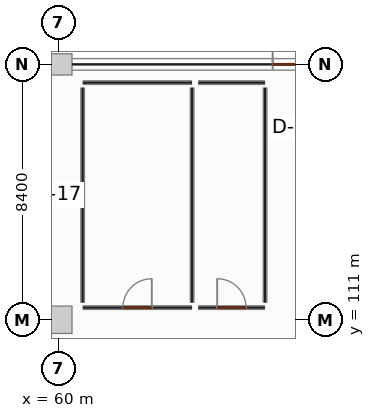
"""IFC4 building model, lengths in metres.
Left out: names, types, materials, properties, quantities, classifications, styles, units other than length and angle.
Written with IfcOpenShell. Run it as: python <this file> out.ifc"""

import sys

from ifc_helpers import new_model, si_unit, direction, frame, frame_2d, origin, origin_2d, place, context, subcontext, project, spatial, rectangle, extrude, element, fill, save


model = new_model("IFC4")
c1 = context("Model", 3, precision=1e-05, world=origin(), true_north=direction((0.0, 1.0)))
c2 = subcontext(c1, "Body", "Model", "MODEL_VIEW")
j1 = project(units=[si_unit("LENGTHUNIT", "METRE"), si_unit("PLANEANGLEUNIT", "RADIAN")], contexts=[c1])
p1 = place(None, origin())
s1 = spatial("IfcSite", under=j1, at=p1, CompositionType="ELEMENT")
p2 = place(p1, origin())
s2 = spatial("IfcBuilding", under=s1, at=p2, CompositionType="ELEMENT")
p3 = place(p2, origin())
s3 = spatial("IfcBuildingStorey", under=s2, at=p3, CompositionType="ELEMENT", Elevation=0.0)
p4 = place(p3, frame((60.0, 111.0, 0.0), z_axis=(0.0, 0.0, 1.0), x_axis=(1.0, 0.0, 0.0)))
e1 = element("IfcColumn", 1, at=p4, inside=s3, PredefinedType="COLUMN", context=c2, shape_type="SweptSolid", body=[
    extrude(rectangle(XDim=0.9, YDim=0.9, at=origin_2d()), origin(), (0.0, 0.0, 1.0), 5.08),
])
p5 = place(p3, frame((60.0, 119.4, 0.0), z_axis=(0.0, 0.0, 1.0), x_axis=(1.0, 0.0, 0.0)))
e2 = element("IfcColumn", 2, at=p5, inside=s3, PredefinedType="COLUMN", context=c2, shape_type="SweptSolid", body=[
    extrude(rectangle(XDim=0.9, YDim=0.7, at=origin_2d()), origin(), (0.0, 0.0, 1.0), 5.08),
])
p6 = place(p3, frame((60.452, 119.4, 0.0), z_axis=(0.0, 0.0, 1.0), x_axis=(1.0, 0.0, 0.0)))
e3 = element("IfcWall", 3, at=p6, inside=s3, PredefinedType="SOLIDWALL", context=c2, shape_type="SweptSolid", body=[
    extrude(rectangle(XDim=8.696, YDim=0.38, at=frame_2d((4.348, 0.0))), origin(), (0.0, 0.0, 1.0), 4.28),
])
p7 = place(p6, frame((6.598, 0.0, 0.0)))
e4 = element("IfcOpeningElement", 4, at=p7, cuts=e3, PredefinedType="OPENING", context=c2, shape_type="SweptSolid", body=[
    extrude(rectangle(XDim=1.5, YDim=2.2, at=frame_2d((0.75, 1.1))), frame((0.0, 0.2, 0.0), z_axis=(0.0, -1.0, 0.0), x_axis=(1.0, 0.0, 0.0)), (0.0, 0.0, 1.0), 0.4),
])
p8 = place(p3, frame((60.8, 111.4, 0.0), z_axis=(0.0, 0.0, 1.0), x_axis=(1.0, 0.0, 0.0)))
e5 = element("IfcWall", 5, at=p8, inside=s3, PredefinedType="PARTITIONING", context=c2, shape_type="SweptSolid", body=[
    extrude(rectangle(XDim=3.6, YDim=0.12, at=frame_2d((1.8, 0.0))), origin(), (0.0, 0.0, 1.0), 4.12),
])
p9 = place(p8, frame((1.325, 0.0, 0.0)))
e6 = element("IfcOpeningElement", 6, at=p9, cuts=e5, PredefinedType="OPENING", context=c2, shape_type="SweptSolid", body=[
    extrude(rectangle(XDim=0.95, YDim=2.1, at=frame_2d((0.475, 1.05))), frame((0.0, 0.07, 0.0), z_axis=(0.0, -1.0, 0.0), x_axis=(1.0, 0.0, 0.0)), (0.0, 0.0, 1.0), 0.14),
])
p10 = place(p3, frame((60.8, 118.8, 0.0), z_axis=(0.0, 0.0, 1.0), x_axis=(1.0, 0.0, 0.0)))
e7 = element("IfcWall", 7, at=p10, inside=s3, PredefinedType="PARTITIONING", context=c2, shape_type="SweptSolid", body=[
    extrude(rectangle(XDim=3.6, YDim=0.12, at=frame_2d((1.8, 0.0))), origin(), (0.0, 0.0, 1.0), 4.12),
])
for number, where, z_axis, x_axis in (
    (8, (60.8, 111.56, 0.0), (0.0, 0.0, 1.0), (0.0, 1.0, 0.0)),
    (9, (64.4, 111.56, 0.0), (0.0, 0.0, 1.0), (0.0, 1.0, 0.0)),
):
    element("IfcWall", number, at=place(p3, frame(where, z_axis=z_axis, x_axis=x_axis)), inside=s3, PredefinedType="PARTITIONING", context=c2, shape_type="SweptSolid", body=[
        extrude(rectangle(XDim=7.08, YDim=0.12, at=frame_2d((3.54, 0.0))), origin(), (0.0, 0.0, 1.0), 4.12),
    ])
p11 = place(p3, frame((64.6, 111.4, 0.0), z_axis=(0.0, 0.0, 1.0), x_axis=(1.0, 0.0, 0.0)))
e10 = element("IfcWall", 10, at=p11, inside=s3, PredefinedType="PARTITIONING", context=c2, shape_type="SweptSolid", body=[
    extrude(rectangle(XDim=2.2, YDim=0.12, at=frame_2d((1.1, 0.0))), origin(), (0.0, 0.0, 1.0), 4.12),
])
p12 = place(p11, frame((0.625, 0.0, 0.0)))
e11 = element("IfcOpeningElement", 11, at=p12, cuts=e10, PredefinedType="OPENING", context=c2, shape_type="SweptSolid", body=[
    extrude(rectangle(XDim=0.95, YDim=2.1, at=frame_2d((0.475, 1.05))), frame((0.0, 0.07, 0.0), z_axis=(0.0, -1.0, 0.0), x_axis=(1.0, 0.0, 0.0)), (0.0, 0.0, 1.0), 0.14),
])
p13 = place(p3, frame((64.6, 118.8, 0.0), z_axis=(0.0, 0.0, 1.0), x_axis=(1.0, 0.0, 0.0)))
e12 = element("IfcWall", 12, at=p13, inside=s3, PredefinedType="PARTITIONING", context=c2, shape_type="SweptSolid", body=[
    extrude(rectangle(XDim=2.2, YDim=0.12, at=frame_2d((1.1, 0.0))), origin(), (0.0, 0.0, 1.0), 4.12),
])
p14 = place(p3, frame((66.8, 111.56, 0.0), z_axis=(0.0, 0.0, 1.0), x_axis=(0.0, 1.0, 0.0)))
e13 = element("IfcWall", 13, at=p14, inside=s3, PredefinedType="PARTITIONING", context=c2, shape_type="SweptSolid", body=[
    extrude(rectangle(XDim=7.08, YDim=0.12, at=frame_2d((3.54, 0.0))), origin(), (0.0, 0.0, 1.0), 4.12),
])
p15 = place(p7, origin())
e14 = element("IfcDoor", 14, at=p15, inside=s3, OperationType="SINGLE_SWING_LEFT", PredefinedType="DOOR", context=c2, shape_type="SweptSolid", body=[
    extrude(rectangle(XDim=1.5, YDim=2.2, at=frame_2d((0.75, 1.1))), frame((0.0, 0.025, 0.0), z_axis=(0.0, -1.0, 0.0), x_axis=(1.0, 0.0, 0.0)), (0.0, 0.0, 1.0), 0.05),
])
fill(e4, e14)
p16 = place(p9, origin())
e15 = element("IfcDoor", 15, at=p16, inside=s3, OperationType="SINGLE_SWING_RIGHT", PredefinedType="DOOR", context=c2, shape_type="SweptSolid", body=[
    extrude(rectangle(XDim=0.95, YDim=2.1, at=frame_2d((0.475, 1.05))), frame((0.0, 0.025, 0.0), z_axis=(0.0, -1.0, 0.0), x_axis=(1.0, 0.0, 0.0)), (0.0, 0.0, 1.0), 0.05),
])
fill(e6, e15)
p17 = place(p12, origin())
e16 = element("IfcDoor", 16, at=p17, inside=s3, OperationType="SINGLE_SWING_LEFT", PredefinedType="DOOR", context=c2, shape_type="SweptSolid", body=[
    extrude(rectangle(XDim=0.95, YDim=2.1, at=frame_2d((0.475, 1.05))), frame((0.0, 0.025, 0.0), z_axis=(0.0, -1.0, 0.0), x_axis=(1.0, 0.0, 0.0)), (0.0, 0.0, 1.0), 0.05),
])
fill(e11, e16)
save(model, sys.argv[1])
